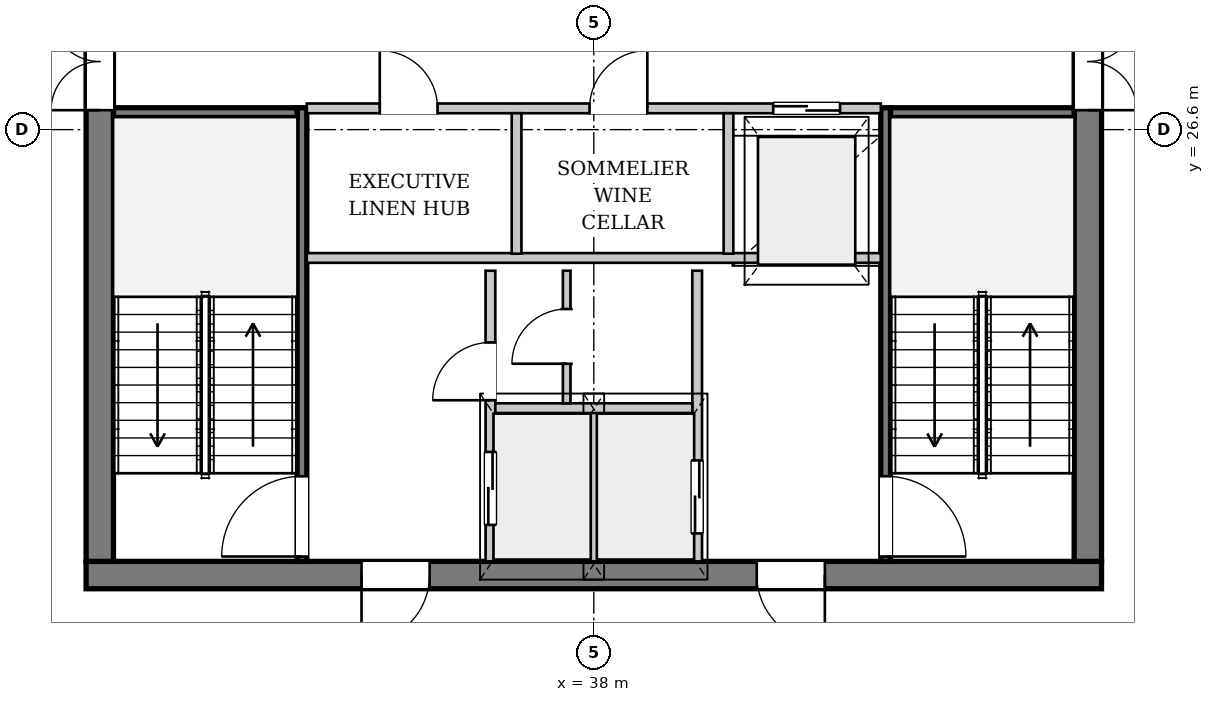
"""IFC4 building model, lengths in metres.
Left out: names, types, materials, properties, quantities, classifications, styles, units other than length and angle.
Written with IfcOpenShell. Run it as: python <this file> out.ifc"""

import sys

from ifc_helpers import new_model, si_unit, direction, frame, frame_2d, origin, place, context, subcontext, project, spatial, rectangle, extrude, source, transform, mapped, element, fill, save


model = new_model("IFC4")
c1 = context("Model", 3, precision=1e-05, world=origin(), true_north=direction((0.0, 1.0)))
c2 = subcontext(c1, "Body", "Model", "MODEL_VIEW")
j1 = project(units=[si_unit("LENGTHUNIT", "METRE"), si_unit("PLANEANGLEUNIT", "RADIAN")], contexts=[c1])
p1 = place(None, origin())
s1 = spatial("IfcSite", under=j1, at=p1, CompositionType="ELEMENT")
p2 = place(p1, origin())
s2 = spatial("IfcBuilding", under=s1, at=p2, CompositionType="ELEMENT")
p3 = place(p2, frame((0.0, 0.0, 238.1)))
s3 = spatial("IfcBuildingStorey", under=s2, at=p3, CompositionType="ELEMENT", Elevation=238.1)
p4 = place(p3, frame((52.502, 25.204, 0.0), z_axis=(0.0, 0.0, 1.0), x_axis=(-0.37055605209, -0.928810105597, 0.0)))
e1 = element("IfcWall", 1, at=p4, inside=s3, PredefinedType="SOLIDWALL", context=c2, shape_type="SweptSolid", body=[
    extrude(rectangle(XDim=22.8, YDim=0.32, at=frame_2d((11.4, 0.0))), origin(), (0.0, 0.0, 1.0), 2.872),
])
p5 = place(p4, frame((6.546, 0.0, 0.0)))
e2 = element("IfcOpeningElement", 2, at=p5, cuts=e1, PredefinedType="OPENING", context=c2, shape_type="SweptSolid", body=[
    extrude(rectangle(XDim=1.5, YDim=2.3, at=frame_2d((0.75, 1.15))), frame((0.0, 0.17, 0.0), z_axis=(0.0, -1.0, 0.0), x_axis=(1.0, 0.0, 0.0)), (0.0, 0.0, 1.0), 0.34),
])
p6 = place(p4, frame((15.572, 0.0, 0.402)))
e3 = element("IfcOpeningElement", 3, at=p6, cuts=e1, PredefinedType="OPENING", context=c2, shape_type="SweptSolid", body=[
    extrude(rectangle(XDim=2.6, YDim=2.35, at=frame_2d((1.3, 1.175))), frame((0.0, 0.17, 0.0), z_axis=(0.0, -1.0, 0.0), x_axis=(1.0, 0.0, 0.0)), (0.0, 0.0, 1.0), 0.34),
])
p7 = place(p3, frame((46.35, 19.275, 0.0), z_axis=(0.0, 0.0, 1.0), x_axis=(-1.0, 0.0, 0.0)))
e4 = element("IfcWall", 4, at=p7, inside=s3, PredefinedType="SHEAR", context=c2, shape_type="SweptSolid", body=[
    extrude(rectangle(XDim=16.7, YDim=0.45, at=frame_2d((8.35, 0.0))), origin(), (0.0, 0.0, 1.0), 3.38),
])
p8 = place(p7, frame((4.55, 0.0, 0.0)))
e5 = element("IfcOpeningElement", 5, at=p8, cuts=e4, PredefinedType="OPENING", context=c2, shape_type="SweptSolid", body=[
    extrude(rectangle(XDim=1.12, YDim=2.25, at=frame_2d((0.56, 1.125))), frame((0.0, 0.235, 0.0), z_axis=(0.0, -1.0, 0.0), x_axis=(1.0, 0.0, 0.0)), (0.0, 0.0, 1.0), 0.47),
])
p9 = place(p7, frame((11.05, 0.0, 0.0)))
e6 = element("IfcOpeningElement", 6, at=p9, cuts=e4, PredefinedType="OPENING", context=c2, shape_type="SweptSolid", body=[
    extrude(rectangle(XDim=1.12, YDim=2.25, at=frame_2d((0.56, 1.125))), frame((0.0, 0.235, 0.0), z_axis=(0.0, -1.0, 0.0), x_axis=(1.0, 0.0, 0.0)), (0.0, 0.0, 1.0), 0.47),
])
p10 = place(p3, frame((29.875, 19.5, 0.0), z_axis=(0.0, 0.0, 1.0), x_axis=(0.0, 1.0, 0.0)))
e7 = element("IfcWall", 7, at=p10, inside=s3, PredefinedType="SHEAR", context=c2, shape_type="SweptSolid", body=[
    extrude(rectangle(XDim=14.2, YDim=0.45, at=frame_2d((7.1, 0.0))), origin(), (0.0, 0.0, 1.0), 3.38),
])
p11 = place(p10, frame((7.42, 0.0, 0.0)))
e8 = element("IfcOpeningElement", 8, at=p11, cuts=e7, PredefinedType="OPENING", context=c2, shape_type="SweptSolid", body=[
    extrude(rectangle(XDim=1.6, YDim=2.2, at=frame_2d((0.8, 1.1))), frame((0.0, 0.235, 0.0), z_axis=(0.0, -1.0, 0.0), x_axis=(1.0, 0.0, 0.0)), (0.0, 0.0, 1.0), 0.47),
])
p12 = place(p3, frame((46.125, 33.7, 0.0), z_axis=(0.0, 0.0, 1.0), x_axis=(0.0, -1.0, 0.0)))
e9 = element("IfcWall", 9, at=p12, inside=s3, PredefinedType="SHEAR", context=c2, shape_type="SweptSolid", body=[
    extrude(rectangle(XDim=14.2, YDim=0.45, at=frame_2d((7.1, 0.0))), origin(), (0.0, 0.0, 1.0), 3.38),
])
p13 = place(p12, frame((5.18, 0.0, 0.0)))
e10 = element("IfcOpeningElement", 10, at=p13, cuts=e9, PredefinedType="OPENING", context=c2, shape_type="SweptSolid", body=[
    extrude(rectangle(XDim=1.6, YDim=2.2, at=frame_2d((0.8, 1.1))), frame((0.0, 0.235, 0.0), z_axis=(0.0, -1.0, 0.0), x_axis=(1.0, 0.0, 0.0)), (0.0, 0.0, 1.0), 0.47),
])
p14 = place(p12, frame((2.05, 0.0, 0.0)))
e11 = element("IfcOpeningElement", 11, at=p14, cuts=e9, PredefinedType="OPENING", context=c2, shape_type="SweptSolid", body=[
    extrude(rectangle(XDim=0.95, YDim=2.1, at=frame_2d((0.475, 1.05))), frame((0.0, 0.235, 0.0), z_axis=(0.0, -1.0, 0.0), x_axis=(1.0, 0.0, 0.0)), (0.0, 0.0, 1.0), 0.47),
])
p15 = place(p3, frame((33.2, 19.5, 0.0), z_axis=(0.0, 0.0, 1.0), x_axis=(0.0, 1.0, 0.0)))
e12 = element("IfcWall", 12, at=p15, inside=s3, PredefinedType="PARTITIONING", context=c2, shape_type="SweptSolid", body=[
    extrude(rectangle(XDim=7.46, YDim=0.16, at=frame_2d((3.73, 0.0))), origin(), (0.0, 0.0, 1.0), 3.38),
])
p16 = place(p15, frame((0.08, 0.0, 0.0)))
e13 = element("IfcOpeningElement", 13, at=p16, cuts=e12, PredefinedType="OPENING", context=c2, shape_type="SweptSolid", body=[
    extrude(rectangle(XDim=1.32, YDim=2.2, at=frame_2d((0.66, 1.1))), frame((0.0, 0.09, 0.0), z_axis=(0.0, -1.0, 0.0), x_axis=(1.0, 0.0, 0.0)), (0.0, 0.0, 1.0), 0.18),
])
p17 = place(p3, frame((30.1, 26.88, 0.0), z_axis=(0.0, 0.0, 1.0), x_axis=(1.0, 0.0, 0.0)))
e14 = element("IfcWall", 14, at=p17, inside=s3, PredefinedType="PARTITIONING", context=c2, shape_type="SweptSolid", body=[
    extrude(rectangle(XDim=3.02, YDim=0.16, at=frame_2d((1.51, 0.0))), origin(), (0.0, 0.0, 1.0), 3.38),
])
p18 = place(p3, frame((42.8, 26.96, 0.0), z_axis=(0.0, 0.0, 1.0), x_axis=(0.0, -1.0, 0.0)))
e15 = element("IfcWall", 15, at=p18, inside=s3, PredefinedType="PARTITIONING", context=c2, shape_type="SweptSolid", body=[
    extrude(rectangle(XDim=7.46, YDim=0.16, at=frame_2d((3.73, 0.0))), origin(), (0.0, 0.0, 1.0), 3.38),
])
p19 = place(p18, frame((6.06, 0.0, 0.0)))
e16 = element("IfcOpeningElement", 16, at=p19, cuts=e15, PredefinedType="OPENING", context=c2, shape_type="SweptSolid", body=[
    extrude(rectangle(XDim=1.32, YDim=2.2, at=frame_2d((0.66, 1.1))), frame((0.0, 0.09, 0.0), z_axis=(0.0, -1.0, 0.0), x_axis=(1.0, 0.0, 0.0)), (0.0, 0.0, 1.0), 0.18),
])
p20 = place(p3, frame((42.88, 26.88, 0.0), z_axis=(0.0, 0.0, 1.0), x_axis=(1.0, 0.0, 0.0)))
e17 = element("IfcWall", 17, at=p20, inside=s3, PredefinedType="PARTITIONING", context=c2, shape_type="SweptSolid", body=[
    extrude(rectangle(XDim=3.02, YDim=0.16, at=frame_2d((1.51, 0.0))), origin(), (0.0, 0.0, 1.0), 3.38),
])
p21 = place(p3, frame((36.3, 19.5, 0.0), z_axis=(0.0, 0.0, 1.0), x_axis=(0.0, 1.0, 0.0)))
e18 = element("IfcWall", 18, at=p21, inside=s3, PredefinedType="PARTITIONING", context=c2, shape_type="SweptSolid", body=[
    extrude(rectangle(XDim=4.78, YDim=0.16, at=frame_2d((2.39, 0.0))), origin(), (0.0, 0.0, 1.0), 3.38),
])
p22 = place(p21, frame((0.6, 0.0, 0.0)))
e19 = element("IfcOpeningElement", 19, at=p22, cuts=e18, PredefinedType="OPENING", context=c2, shape_type="SweptSolid", body=[
    extrude(rectangle(XDim=1.2, YDim=2.2, at=frame_2d((0.6, 1.1))), frame((0.0, 0.09, 0.0), z_axis=(0.0, -1.0, 0.0), x_axis=(1.0, 0.0, 0.0)), (0.0, 0.0, 1.0), 0.18),
])
p23 = place(p21, frame((2.65, 0.0, 0.0)))
e20 = element("IfcOpeningElement", 20, at=p23, cuts=e18, PredefinedType="OPENING", context=c2, shape_type="SweptSolid", body=[
    extrude(rectangle(XDim=0.95, YDim=2.1, at=frame_2d((0.475, 1.05))), frame((0.0, 0.09, 0.0), z_axis=(0.0, -1.0, 0.0), x_axis=(1.0, 0.0, 0.0)), (0.0, 0.0, 1.0), 0.18),
])
p24 = place(p3, frame((39.7, 24.28, 0.0), z_axis=(0.0, 0.0, 1.0), x_axis=(0.0, -1.0, 0.0)))
e21 = element("IfcWall", 21, at=p24, inside=s3, PredefinedType="PARTITIONING", context=c2, shape_type="SweptSolid", body=[
    extrude(rectangle(XDim=4.78, YDim=0.16, at=frame_2d((2.39, 0.0))), origin(), (0.0, 0.0, 1.0), 3.38),
])
p25 = place(p24, frame((3.12, 0.0, 0.0)))
e22 = element("IfcOpeningElement", 22, at=p25, cuts=e21, PredefinedType="OPENING", context=c2, shape_type="SweptSolid", body=[
    extrude(rectangle(XDim=1.2, YDim=2.2, at=frame_2d((0.6, 1.1))), frame((0.0, 0.09, 0.0), z_axis=(0.0, -1.0, 0.0), x_axis=(1.0, 0.0, 0.0)), (0.0, 0.0, 1.0), 0.18),
])
p26 = place(p3, frame((38.0, 19.5, 0.0), z_axis=(0.0, 0.0, 1.0), x_axis=(0.0, 1.0, 0.0)))
e23 = element("IfcWall", 23, at=p26, inside=s3, PredefinedType="PARTITIONING", context=c2, shape_type="SweptSolid", body=[
    extrude(rectangle(XDim=2.46, YDim=0.125, at=frame_2d((1.23, 0.0))), origin(), (0.0, 0.0, 1.0), 3.38),
])
p27 = place(p3, frame((36.38, 22.02, 0.0), z_axis=(0.0, 0.0, 1.0), x_axis=(1.0, 0.0, 0.0)))
e24 = element("IfcWall", 24, at=p27, inside=s3, PredefinedType="PARTITIONING", context=c2, shape_type="SweptSolid", body=[
    extrude(rectangle(XDim=3.24, YDim=0.16, at=frame_2d((1.62, 0.0))), origin(), (0.0, 0.0, 1.0), 3.38),
])
p28 = place(p3, frame((33.28, 24.49, 0.0), z_axis=(0.0, 0.0, 1.0), x_axis=(1.0, 0.0, 0.0)))
e25 = element("IfcWall", 25, at=p28, inside=s3, PredefinedType="PARTITIONING", context=c2, shape_type="SweptSolid", body=[
    extrude(rectangle(XDim=9.44, YDim=0.16, at=frame_2d((4.72, 0.0))), origin(), (0.0, 0.0, 1.0), 3.38),
])
p29 = place(p3, frame((37.554, 22.1, 0.0), z_axis=(0.0, 0.0, 1.0), x_axis=(0.0, 1.0, 0.0)))
e26 = element("IfcWall", 26, at=p29, inside=s3, PredefinedType="PARTITIONING", context=c2, shape_type="SweptSolid", body=[
    extrude(rectangle(XDim=2.18, YDim=0.125, at=frame_2d((1.09, 0.0))), origin(), (0.0, 0.0, 1.0), 3.38),
])
p30 = place(p29, frame((0.65, 0.0, 0.0)))
e27 = element("IfcOpeningElement", 27, at=p30, cuts=e26, PredefinedType="OPENING", context=c2, shape_type="SweptSolid", body=[
    extrude(rectangle(XDim=0.9, YDim=2.1, at=frame_2d((0.45, 1.05))), frame((0.0, 0.073, 0.0), z_axis=(0.0, -1.0, 0.0), x_axis=(1.0, 0.0, 0.0)), (0.0, 0.0, 1.0), 0.145),
])
p31 = place(p3, frame((33.28, 26.95, 0.0), z_axis=(0.0, 0.0, 1.0), x_axis=(1.0, 0.0, 0.0)))
e28 = element("IfcWall", 28, at=p31, inside=s3, PredefinedType="PARTITIONING", context=c2, shape_type="SweptSolid", body=[
    extrude(rectangle(XDim=9.44, YDim=0.16, at=frame_2d((4.72, 0.0))), origin(), (0.0, 0.0, 1.0), 3.38),
])
p32 = place(p31, frame((1.2, 0.0, 0.0)))
e29 = element("IfcOpeningElement", 29, at=p32, cuts=e28, PredefinedType="OPENING", context=c2, shape_type="SweptSolid", body=[
    extrude(rectangle(XDim=0.95, YDim=2.1, at=frame_2d((0.475, 1.05))), frame((0.0, 0.09, 0.0), z_axis=(0.0, -1.0, 0.0), x_axis=(1.0, 0.0, 0.0)), (0.0, 0.0, 1.0), 0.18),
])
p33 = place(p31, frame((4.65, 0.0, 0.0)))
e30 = element("IfcOpeningElement", 30, at=p33, cuts=e28, PredefinedType="OPENING", context=c2, shape_type="SweptSolid", body=[
    extrude(rectangle(XDim=0.95, YDim=2.1, at=frame_2d((0.475, 1.05))), frame((0.0, 0.09, 0.0), z_axis=(0.0, -1.0, 0.0), x_axis=(1.0, 0.0, 0.0)), (0.0, 0.0, 1.0), 0.18),
])
p34 = place(p31, frame((7.67, 0.0, 0.0)))
e31 = element("IfcOpeningElement", 31, at=p34, cuts=e28, PredefinedType="OPENING", context=c2, shape_type="SweptSolid", body=[
    extrude(rectangle(XDim=1.1, YDim=2.2, at=frame_2d((0.55, 1.1))), frame((0.0, 0.09, 0.0), z_axis=(0.0, -1.0, 0.0), x_axis=(1.0, 0.0, 0.0)), (0.0, 0.0, 1.0), 0.18),
])
for number, where, z_axis, x_axis in (
    (32, (36.73, 24.56, 0.0), (0.0, 0.0, 1.0), (0.0, 1.0, 0.0)),
    (33, (40.215, 24.56, 0.0), (0.0, 0.0, 1.0), (0.0, 1.0, 0.0)),
):
    element("IfcWall", number, at=place(p3, frame(where, z_axis=z_axis, x_axis=x_axis)), inside=s3, PredefinedType="PARTITIONING", context=c2, shape_type="SweptSolid", body=[
        extrude(rectangle(XDim=2.31, YDim=0.16, at=frame_2d((1.155, 0.0))), origin(), (0.0, 0.0, 1.0), 3.38),
    ])
m1 = source(origin(), c2, "Body", "SweptSolid", [
    extrude(rectangle(XDim=1.12, YDim=2.25, at=frame_2d((0.56, 1.125))), frame((0.0, 0.025, 0.0), z_axis=(0.0, -1.0, 0.0), x_axis=(1.0, 0.0, 0.0)), (0.0, 0.0, 1.0), 0.05),
])
p35 = place(p8, origin())
e34 = element("IfcDoor", 34, at=p35, inside=s3, OperationType="SINGLE_SWING_LEFT", PredefinedType="DOOR", context=c2, shape_type="MappedRepresentation", body=[
    mapped(m1, transform((0.0, 0.0, 0.0), x_axis=(1.0, 0.0, 0.0), y_axis=(0.0, 1.0, 0.0), z_axis=(0.0, 0.0, 1.0), scale=1.0)),
])
fill(e5, e34)
p36 = place(p9, origin())
e35 = element("IfcDoor", 35, at=p36, inside=s3, OperationType="SINGLE_SWING_RIGHT", PredefinedType="DOOR", context=c2, shape_type="MappedRepresentation", body=[
    mapped(m1, transform((0.0, 0.0, 0.0), x_axis=(1.0, 0.0, 0.0), y_axis=(0.0, 1.0, 0.0), z_axis=(0.0, 0.0, 1.0), scale=1.0)),
])
fill(e6, e35)
m2 = source(origin(), c2, "Body", "SweptSolid", [
    extrude(rectangle(XDim=1.6, YDim=2.2, at=frame_2d((0.8, 1.1))), frame((0.0, 0.025, 0.0), z_axis=(0.0, -1.0, 0.0), x_axis=(1.0, 0.0, 0.0)), (0.0, 0.0, 1.0), 0.05),
])
p37 = place(p11, origin())
e36 = element("IfcDoor", 36, at=p37, inside=s3, OperationType="DOUBLE_DOOR_SINGLE_SWING", PredefinedType="DOOR", context=c2, shape_type="MappedRepresentation", body=[
    mapped(m2, transform((0.0, 0.0, 0.0), x_axis=(1.0, 0.0, 0.0), y_axis=(0.0, 1.0, 0.0), z_axis=(0.0, 0.0, 1.0), scale=1.0)),
])
fill(e8, e36)
p38 = place(p13, origin())
e37 = element("IfcDoor", 37, at=p38, inside=s3, OperationType="DOUBLE_DOOR_SINGLE_SWING", PredefinedType="DOOR", context=c2, shape_type="MappedRepresentation", body=[
    mapped(m2, transform((0.0, 0.0, 0.0), x_axis=(1.0, 0.0, 0.0), y_axis=(0.0, 1.0, 0.0), z_axis=(0.0, 0.0, 1.0), scale=1.0)),
])
fill(e10, e37)
m3 = source(origin(), c2, "Body", "SweptSolid", [
    extrude(rectangle(XDim=1.32, YDim=2.2, at=frame_2d((0.66, 1.1))), frame((0.0, 0.025, 0.0), z_axis=(0.0, -1.0, 0.0), x_axis=(1.0, 0.0, 0.0)), (0.0, 0.0, 1.0), 0.05),
])
p39 = place(p16, origin())
e38 = element("IfcDoor", 38, at=p39, inside=s3, OperationType="SINGLE_SWING_LEFT", PredefinedType="DOOR", context=c2, shape_type="MappedRepresentation", body=[
    mapped(m3, transform((0.0, 0.0, 0.0), x_axis=(1.0, 0.0, 0.0), y_axis=(0.0, 1.0, 0.0), z_axis=(0.0, 0.0, 1.0), scale=1.0)),
])
fill(e13, e38)
p40 = place(p19, origin())
e39 = element("IfcDoor", 39, at=p40, inside=s3, OperationType="SINGLE_SWING_RIGHT", PredefinedType="DOOR", context=c2, shape_type="MappedRepresentation", body=[
    mapped(m3, transform((0.0, 0.0, 0.0), x_axis=(1.0, 0.0, 0.0), y_axis=(0.0, 1.0, 0.0), z_axis=(0.0, 0.0, 1.0), scale=1.0)),
])
fill(e16, e39)
m4 = source(origin(), c2, "Body", "SweptSolid", [
    extrude(rectangle(XDim=1.2, YDim=2.2, at=frame_2d((0.6, 1.1))), frame((0.0, 0.025, 0.0), z_axis=(0.0, -1.0, 0.0), x_axis=(1.0, 0.0, 0.0)), (0.0, 0.0, 1.0), 0.05),
])
p41 = place(p22, origin())
e40 = element("IfcDoor", 40, at=p41, inside=s3, OperationType="DOUBLE_DOOR_SLIDING", PredefinedType="DOOR", context=c2, shape_type="MappedRepresentation", body=[
    mapped(m4, transform((0.0, 0.0, 0.0), x_axis=(1.0, 0.0, 0.0), y_axis=(0.0, 1.0, 0.0), z_axis=(0.0, 0.0, 1.0), scale=1.0)),
])
fill(e19, e40)
m5 = source(origin(), c2, "Body", "SweptSolid", [
    extrude(rectangle(XDim=0.95, YDim=2.1, at=frame_2d((0.475, 1.05))), frame((0.0, 0.025, 0.0), z_axis=(0.0, -1.0, 0.0), x_axis=(1.0, 0.0, 0.0)), (0.0, 0.0, 1.0), 0.05),
])
p42 = place(p23, origin())
e41 = element("IfcDoor", 41, at=p42, inside=s3, OperationType="SINGLE_SWING_LEFT", PredefinedType="DOOR", context=c2, shape_type="MappedRepresentation", body=[
    mapped(m5, transform((0.0, 0.0, 0.0), x_axis=(1.0, 0.0, 0.0), y_axis=(0.0, 1.0, 0.0), z_axis=(0.0, 0.0, 1.0), scale=1.0)),
])
fill(e20, e41)
m6 = source(origin(), c2, "Body", "SweptSolid", [
    extrude(rectangle(XDim=0.9, YDim=2.1, at=frame_2d((0.45, 1.05))), frame((0.0, 0.025, 0.0), z_axis=(0.0, -1.0, 0.0), x_axis=(1.0, 0.0, 0.0)), (0.0, 0.0, 1.0), 0.05),
])
p43 = place(p30, origin())
e42 = element("IfcDoor", 42, at=p43, inside=s3, OperationType="SINGLE_SWING_LEFT", PredefinedType="DOOR", context=c2, shape_type="MappedRepresentation", body=[
    mapped(m6, transform((0.0, 0.0, 0.0), x_axis=(1.0, 0.0, 0.0), y_axis=(0.0, 1.0, 0.0), z_axis=(0.0, 0.0, 1.0), scale=1.0)),
])
fill(e27, e42)
p44 = place(p25, origin())
e43 = element("IfcDoor", 43, at=p44, inside=s3, OperationType="DOUBLE_DOOR_SLIDING", PredefinedType="DOOR", context=c2, shape_type="MappedRepresentation", body=[
    mapped(m4, transform((0.0, 0.0, 0.0), x_axis=(1.0, 0.0, 0.0), y_axis=(0.0, 1.0, 0.0), z_axis=(0.0, 0.0, 1.0), scale=1.0)),
])
fill(e22, e43)
p45 = place(p32, origin())
e44 = element("IfcDoor", 44, at=p45, inside=s3, OperationType="SINGLE_SWING_LEFT", PredefinedType="DOOR", context=c2, shape_type="MappedRepresentation", body=[
    mapped(m5, transform((0.0, 0.0, 0.0), x_axis=(1.0, 0.0, 0.0), y_axis=(0.0, 1.0, 0.0), z_axis=(0.0, 0.0, 1.0), scale=1.0)),
])
fill(e29, e44)
p46 = place(p33, origin())
e45 = element("IfcDoor", 45, at=p46, inside=s3, OperationType="SINGLE_SWING_RIGHT", PredefinedType="DOOR", context=c2, shape_type="MappedRepresentation", body=[
    mapped(m5, transform((0.0, 0.0, 0.0), x_axis=(1.0, 0.0, 0.0), y_axis=(0.0, 1.0, 0.0), z_axis=(0.0, 0.0, 1.0), scale=1.0)),
])
fill(e30, e45)
m7 = source(origin(), c2, "Body", "SweptSolid", [
    extrude(rectangle(XDim=1.1, YDim=2.2, at=frame_2d((0.55, 1.1))), frame((0.0, 0.025, 0.0), z_axis=(0.0, -1.0, 0.0), x_axis=(1.0, 0.0, 0.0)), (0.0, 0.0, 1.0), 0.05),
])
p47 = place(p34, origin())
e46 = element("IfcDoor", 46, at=p47, inside=s3, OperationType="DOUBLE_DOOR_SLIDING", PredefinedType="DOOR", context=c2, shape_type="MappedRepresentation", body=[
    mapped(m7, transform((0.0, 0.0, 0.0), x_axis=(1.0, 0.0, 0.0), y_axis=(0.0, 1.0, 0.0), z_axis=(0.0, 0.0, 1.0), scale=1.0)),
])
fill(e31, e46)
save(model, sys.argv[1])
